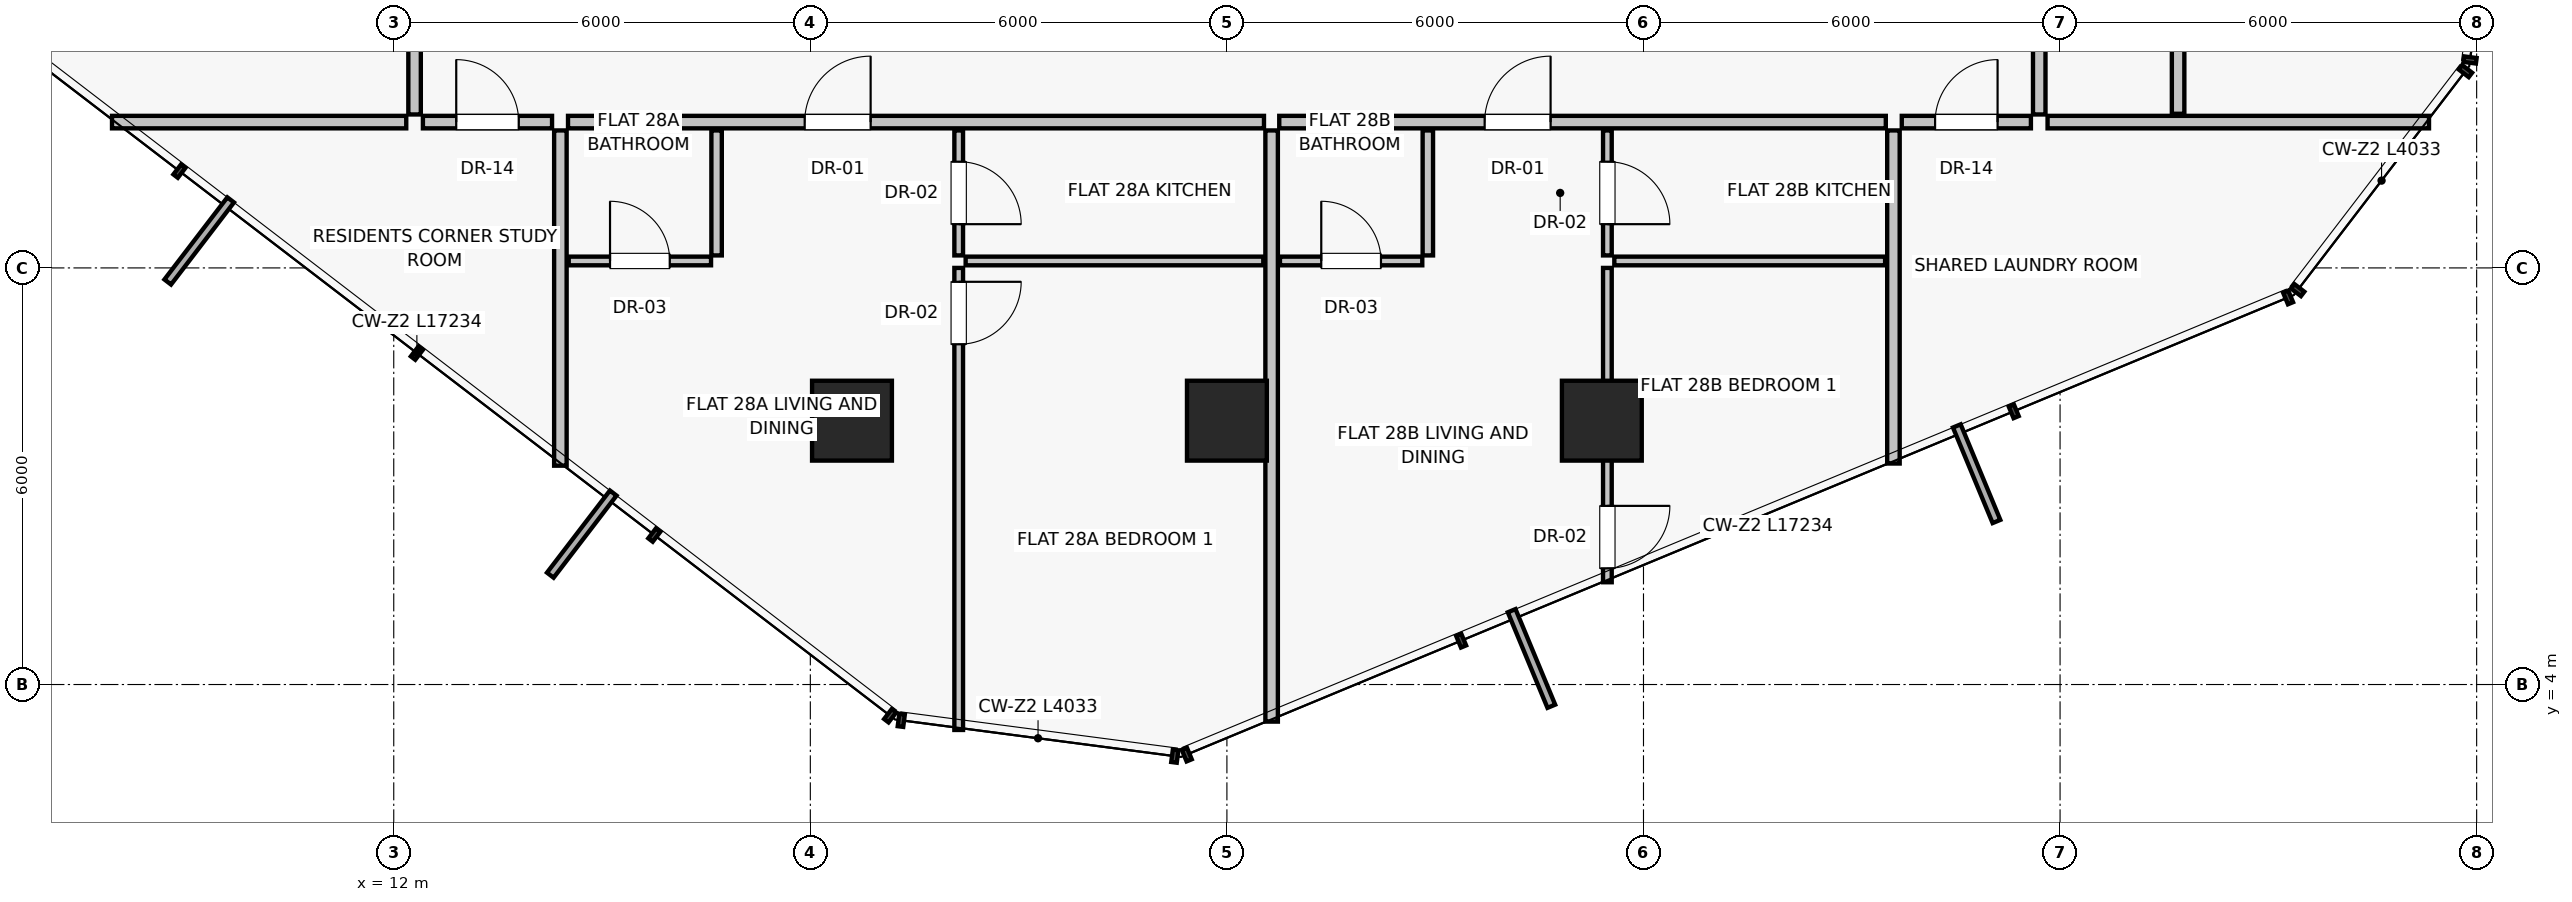
"""IFC4 building model, lengths in metres.
Left out: names, types, materials, properties, quantities, classifications, styles, units other than length and angle.
Written with IfcOpenShell. Run it as: python <this file> out.ifc"""

import sys

from ifc_helpers import new_model, si_unit, direction, frame, frame_2d, origin, origin_2d, place, context, subcontext, project, spatial, rectangle, extrude, source, transform, mapped, element, fill, save


model = new_model("IFC4")
c1 = context("Model", 3, precision=1e-05, world=origin(), true_north=direction((0.0, 1.0)))
c2 = subcontext(c1, "Body", "Model", "MODEL_VIEW")
j1 = project(units=[si_unit("LENGTHUNIT", "METRE"), si_unit("PLANEANGLEUNIT", "RADIAN")], contexts=[c1])
p1 = place(None, origin())
s1 = spatial("IfcSite", under=j1, at=p1, CompositionType="ELEMENT")
p2 = place(p1, origin())
s2 = spatial("IfcBuilding", under=s1, at=p2, CompositionType="ELEMENT")
p3 = place(p2, frame((0.0, 0.0, 102.45)))
s3 = spatial("IfcBuildingStorey", under=s2, at=p3, CompositionType="ELEMENT", Elevation=102.45)
for number, where, z_axis, x_axis in (
    (1, (18.6, 7.8, 0.0), (0.0, 0.0, 1.0), (1.0, 0.0, 0.0)),
    (2, (24.0, 7.8, 0.0), (0.0, 0.0, 1.0), (1.0, 0.0, 0.0)),
    (3, (29.4, 7.8, 0.0), (0.0, 0.0, 1.0), (1.0, 0.0, 0.0)),
):
    element("IfcColumn", number, at=place(p3, frame(where, z_axis=z_axis, x_axis=x_axis)), inside=s3, PredefinedType="COLUMN", context=c2, shape_type="SweptSolid", body=[
        extrude(rectangle(XDim=1.15, YDim=1.15, at=origin_2d()), origin(), (0.0, 0.0, 1.0), 3.25),
    ])
p4 = place(p3, frame((14.4, 11.98, 0.0), z_axis=(0.0, 0.0, 1.0), x_axis=(0.0, -1.0, 0.0)))
e4 = element("IfcWall", 4, at=p4, inside=s3, PredefinedType="PARTITIONING", context=c2, shape_type="SweptSolid", body=[
    extrude(rectangle(XDim=4.828, YDim=0.18, at=frame_2d((2.414, 0.0))), origin(), (0.0, 0.0, 1.0), 3.0),
])
p5 = place(p3, frame((33.6, 11.98, 0.0), z_axis=(0.0, 0.0, 1.0), x_axis=(0.0, -1.0, 0.0)))
e5 = element("IfcWall", 5, at=p5, inside=s3, PredefinedType="PARTITIONING", context=c2, shape_type="SweptSolid", body=[
    extrude(rectangle(XDim=4.797, YDim=0.18, at=frame_2d((2.398, 0.0))), origin(), (0.0, 0.0, 1.0), 3.0),
])
p6 = place(p3, frame((14.51, 12.1, 0.0), z_axis=(0.0, 0.0, 1.0), x_axis=(1.0, 0.0, 0.0)))
e6 = element("IfcWall", 6, at=p6, inside=s3, PredefinedType="PARTITIONING", context=c2, shape_type="SweptSolid", body=[
    extrude(rectangle(XDim=10.024, YDim=0.18, at=frame_2d((5.012, 0.0))), origin(), (0.0, 0.0, 1.0), 2.58),
])
p7 = place(p6, frame((3.408, 0.0, 0.0)))
e7 = element("IfcOpeningElement", 7, at=p7, cuts=e6, PredefinedType="OPENING", context=c2, shape_type="SweptSolid", body=[
    extrude(rectangle(XDim=0.95, YDim=2.02, at=frame_2d((0.475, 1.01))), frame((0.0, 0.1, 0.0), z_axis=(0.0, -1.0, 0.0), x_axis=(1.0, 0.0, 0.0)), (0.0, 0.0, 1.0), 0.2),
])
p8 = place(p3, frame((16.65, 11.98, 0.0), z_axis=(0.0, 0.0, 1.0), x_axis=(0.0, -1.0, 0.0)))
e8 = element("IfcWall", 8, at=p8, inside=s3, PredefinedType="PARTITIONING", context=c2, shape_type="SweptSolid", body=[
    extrude(rectangle(XDim=1.8, YDim=0.15, at=frame_2d((0.9, 0.0))), origin(), (0.0, 0.0, 1.0), 3.0),
])
p9 = place(p3, frame((14.52, 10.1, 0.0), z_axis=(0.0, 0.0, 1.0), x_axis=(1.0, 0.0, 0.0)))
e9 = element("IfcWall", 9, at=p9, inside=s3, PredefinedType="PARTITIONING", context=c2, shape_type="SweptSolid", body=[
    extrude(rectangle(XDim=2.05, YDim=0.125, at=frame_2d((1.025, 0.0))), origin(), (0.0, 0.0, 1.0), 3.0),
])
p10 = place(p9, frame((0.595, 0.0, 0.0)))
e10 = element("IfcOpeningElement", 10, at=p10, cuts=e9, PredefinedType="OPENING", context=c2, shape_type="SweptSolid", body=[
    extrude(rectangle(XDim=0.86, YDim=2.01, at=frame_2d((0.43, 1.005))), frame((0.0, 0.073, 0.0), z_axis=(0.0, -1.0, 0.0), x_axis=(1.0, 0.0, 0.0)), (0.0, 0.0, 1.0), 0.145),
])
p11 = place(p3, frame((20.137, 11.98, 0.0), z_axis=(0.0, 0.0, 1.0), x_axis=(0.0, -1.0, 0.0)))
e11 = element("IfcWall", 11, at=p11, inside=s3, PredefinedType="PARTITIONING", context=c2, shape_type="SweptSolid", body=[
    extrude(rectangle(XDim=1.8, YDim=0.125, at=frame_2d((0.9, 0.0))), origin(), (0.0, 0.0, 1.0), 3.0),
])
p12 = place(p11, frame((0.45, 0.0, 0.0)))
e12 = element("IfcOpeningElement", 12, at=p12, cuts=e11, PredefinedType="OPENING", context=c2, shape_type="SweptSolid", body=[
    extrude(rectangle(XDim=0.9, YDim=2.01, at=frame_2d((0.45, 1.005))), frame((0.0, 0.073, 0.0), z_axis=(0.0, -1.0, 0.0), x_axis=(1.0, 0.0, 0.0)), (0.0, 0.0, 1.0), 0.145),
])
p13 = place(p3, frame((20.237, 10.1, 0.0), z_axis=(0.0, 0.0, 1.0), x_axis=(1.0, 0.0, 0.0)))
e13 = element("IfcWall", 13, at=p13, inside=s3, PredefinedType="PARTITIONING", context=c2, shape_type="SweptSolid", body=[
    extrude(rectangle(XDim=4.287, YDim=0.125, at=frame_2d((2.144, 0.0))), origin(), (0.0, 0.0, 1.0), 3.0),
])
p14 = place(p3, frame((20.137, 10.0, 0.0), z_axis=(0.0, 0.0, 1.0), x_axis=(0.0, -1.0, 0.0)))
e14 = element("IfcWall", 14, at=p14, inside=s3, PredefinedType="PARTITIONING", context=c2, shape_type="SweptSolid", body=[
    extrude(rectangle(XDim=6.654, YDim=0.125, at=frame_2d((3.327, 0.0))), origin(), (0.0, 0.0, 1.0), 3.0),
])
p15 = place(p14, frame((0.2, 0.0, 0.0)))
e15 = element("IfcOpeningElement", 15, at=p15, cuts=e14, PredefinedType="OPENING", context=c2, shape_type="SweptSolid", body=[
    extrude(rectangle(XDim=0.9, YDim=2.01, at=frame_2d((0.45, 1.005))), frame((0.0, 0.073, 0.0), z_axis=(0.0, -1.0, 0.0), x_axis=(1.0, 0.0, 0.0)), (0.0, 0.0, 1.0), 0.145),
])
p16 = place(p3, frame((24.644, 11.98, 0.0), z_axis=(0.0, 0.0, 1.0), x_axis=(0.0, -1.0, 0.0)))
e16 = element("IfcWall", 16, at=p16, inside=s3, PredefinedType="PARTITIONING", context=c2, shape_type="SweptSolid", body=[
    extrude(rectangle(XDim=8.514, YDim=0.18, at=frame_2d((4.257, 0.0))), origin(), (0.0, 0.0, 1.0), 3.0),
])
p17 = place(p3, frame((24.754, 12.1, 0.0), z_axis=(0.0, 0.0, 1.0), x_axis=(1.0, 0.0, 0.0)))
e17 = element("IfcWall", 17, at=p17, inside=s3, PredefinedType="PARTITIONING", context=c2, shape_type="SweptSolid", body=[
    extrude(rectangle(XDim=8.736, YDim=0.18, at=frame_2d((4.368, 0.0))), origin(), (0.0, 0.0, 1.0), 2.58),
])
p18 = place(p17, frame((2.958, 0.0, 0.0)))
e18 = element("IfcOpeningElement", 18, at=p18, cuts=e17, PredefinedType="OPENING", context=c2, shape_type="SweptSolid", body=[
    extrude(rectangle(XDim=0.95, YDim=2.02, at=frame_2d((0.475, 1.01))), frame((0.0, 0.1, 0.0), z_axis=(0.0, -1.0, 0.0), x_axis=(1.0, 0.0, 0.0)), (0.0, 0.0, 1.0), 0.2),
])
p19 = place(p3, frame((26.894, 11.98, 0.0), z_axis=(0.0, 0.0, 1.0), x_axis=(0.0, -1.0, 0.0)))
e19 = element("IfcWall", 19, at=p19, inside=s3, PredefinedType="PARTITIONING", context=c2, shape_type="SweptSolid", body=[
    extrude(rectangle(XDim=1.8, YDim=0.15, at=frame_2d((0.9, 0.0))), origin(), (0.0, 0.0, 1.0), 3.0),
])
p20 = place(p3, frame((24.764, 10.1, 0.0), z_axis=(0.0, 0.0, 1.0), x_axis=(1.0, 0.0, 0.0)))
e20 = element("IfcWall", 20, at=p20, inside=s3, PredefinedType="PARTITIONING", context=c2, shape_type="SweptSolid", body=[
    extrude(rectangle(XDim=2.05, YDim=0.125, at=frame_2d((1.025, 0.0))), origin(), (0.0, 0.0, 1.0), 3.0),
])
p21 = place(p20, frame((0.595, 0.0, 0.0)))
e21 = element("IfcOpeningElement", 21, at=p21, cuts=e20, PredefinedType="OPENING", context=c2, shape_type="SweptSolid", body=[
    extrude(rectangle(XDim=0.86, YDim=2.01, at=frame_2d((0.43, 1.005))), frame((0.0, 0.073, 0.0), z_axis=(0.0, -1.0, 0.0), x_axis=(1.0, 0.0, 0.0)), (0.0, 0.0, 1.0), 0.145),
])
p22 = place(p3, frame((29.48, 11.98, 0.0), z_axis=(0.0, 0.0, 1.0), x_axis=(0.0, -1.0, 0.0)))
e22 = element("IfcWall", 22, at=p22, inside=s3, PredefinedType="PARTITIONING", context=c2, shape_type="SweptSolid", body=[
    extrude(rectangle(XDim=1.8, YDim=0.125, at=frame_2d((0.9, 0.0))), origin(), (0.0, 0.0, 1.0), 2.378),
])
p23 = place(p22, frame((0.45, 0.0, 0.0)))
e23 = element("IfcOpeningElement", 23, at=p23, cuts=e22, PredefinedType="OPENING", context=c2, shape_type="SweptSolid", body=[
    extrude(rectangle(XDim=0.9, YDim=2.01, at=frame_2d((0.45, 1.005))), frame((0.0, 0.073, 0.0), z_axis=(0.0, -1.0, 0.0), x_axis=(1.0, 0.0, 0.0)), (0.0, 0.0, 1.0), 0.145),
])
p24 = place(p3, frame((29.58, 10.1, 0.0), z_axis=(0.0, 0.0, 1.0), x_axis=(1.0, 0.0, 0.0)))
e24 = element("IfcWall", 24, at=p24, inside=s3, PredefinedType="PARTITIONING", context=c2, shape_type="SweptSolid", body=[
    extrude(rectangle(XDim=3.9, YDim=0.125, at=frame_2d((1.95, 0.0))), origin(), (0.0, 0.0, 1.0), 3.0),
])
p25 = place(p3, frame((29.48, 10.0, 0.0), z_axis=(0.0, 0.0, 1.0), x_axis=(0.0, -1.0, 0.0)))
e25 = element("IfcWall", 25, at=p25, inside=s3, PredefinedType="PARTITIONING", context=c2, shape_type="SweptSolid", body=[
    extrude(rectangle(XDim=4.527, YDim=0.125, at=frame_2d((2.264, 0.0))), origin(), (0.0, 0.0, 1.0), 2.378),
])
p26 = place(p25, frame((3.427, 0.0, 0.0)))
e26 = element("IfcOpeningElement", 26, at=p26, cuts=e25, PredefinedType="OPENING", context=c2, shape_type="SweptSolid", body=[
    extrude(rectangle(XDim=0.9, YDim=2.01, at=frame_2d((0.45, 1.005))), frame((0.0, 0.073, 0.0), z_axis=(0.0, -1.0, 0.0), x_axis=(1.0, 0.0, 0.0)), (0.0, 0.0, 1.0), 0.145),
])
p27 = place(p3, frame((12.18, 12.1, 0.0), z_axis=(0.0, 0.0, 1.0), x_axis=(-1.0, 0.0, 0.0)))
e27 = element("IfcWall", 27, at=p27, inside=s3, PredefinedType="PARTITIONING", context=c2, shape_type="SweptSolid", body=[
    extrude(rectangle(XDim=4.238, YDim=0.18, at=frame_2d((2.119, 0.0))), origin(), (0.0, 0.0, 1.0), 3.0),
])
p28 = place(p3, frame((12.3, 12.21, 0.0), z_axis=(0.0, 0.0, 1.0), x_axis=(0.0, 1.0, 0.0)))
e28 = element("IfcWall", 28, at=p28, inside=s3, PredefinedType="PARTITIONING", context=c2, shape_type="SweptSolid", body=[
    extrude(rectangle(XDim=4.626, YDim=0.18, at=frame_2d((2.313, 0.0))), origin(), (0.0, 0.0, 1.0), 3.0),
])
p29 = place(p28, frame((1.813, 0.0, 0.0)))
e29 = element("IfcOpeningElement", 29, at=p29, cuts=e28, PredefinedType="OPENING", context=c2, shape_type="SweptSolid", body=[
    extrude(rectangle(XDim=1.0, YDim=2.01, at=frame_2d((0.5, 1.005))), frame((0.0, 0.1, 0.0), z_axis=(0.0, -1.0, 0.0), x_axis=(1.0, 0.0, 0.0)), (0.0, 0.0, 1.0), 0.2),
])
p30 = place(p3, frame((35.82, 12.1, 0.0), z_axis=(0.0, 0.0, 1.0), x_axis=(1.0, 0.0, 0.0)))
e30 = element("IfcWall", 30, at=p30, inside=s3, PredefinedType="PARTITIONING", context=c2, shape_type="SweptSolid", body=[
    extrude(rectangle(XDim=5.494, YDim=0.18, at=frame_2d((2.747, 0.0))), origin(), (0.0, 0.0, 1.0), 3.0),
])
p31 = place(p3, frame((35.7, 12.21, 0.0), z_axis=(0.0, 0.0, 1.0), x_axis=(0.0, 1.0, 0.0)))
e31 = element("IfcWall", 31, at=p31, inside=s3, PredefinedType="PARTITIONING", context=c2, shape_type="SweptSolid", body=[
    extrude(rectangle(XDim=6.28, YDim=0.18, at=frame_2d((3.14, 0.0))), origin(), (0.0, 0.0, 1.0), 2.58),
])
p32 = place(p31, frame((2.64, 0.0, 0.0)))
e32 = element("IfcOpeningElement", 32, at=p32, cuts=e31, PredefinedType="OPENING", context=c2, shape_type="SweptSolid", body=[
    extrude(rectangle(XDim=1.0, YDim=2.01, at=frame_2d((0.5, 1.005))), frame((0.0, 0.1, 0.0), z_axis=(0.0, -1.0, 0.0), x_axis=(1.0, 0.0, 0.0)), (0.0, 0.0, 1.0), 0.2),
])
p33 = place(p3, frame((37.7, 12.22, 0.0), z_axis=(0.0, 0.0, 1.0), x_axis=(0.0, 1.0, 0.0)))
e33 = element("IfcWall", 33, at=p33, inside=s3, PredefinedType="PARTITIONING", context=c2, shape_type="SweptSolid", body=[
    extrude(rectangle(XDim=6.28, YDim=0.18, at=frame_2d((3.14, 0.0))), origin(), (0.0, 0.0, 1.0), 3.0),
])
p34 = place(p3, frame((12.42, 12.1, 0.0), z_axis=(0.0, 0.0, 1.0), x_axis=(1.0, 0.0, 0.0)))
e34 = element("IfcWall", 34, at=p34, inside=s3, PredefinedType="PARTITIONING", context=c2, shape_type="SweptSolid", body=[
    extrude(rectangle(XDim=1.86, YDim=0.18, at=frame_2d((0.93, 0.0))), origin(), (0.0, 0.0, 1.0), 3.0),
])
p35 = place(p34, frame((0.48, 0.0, 0.0)))
e35 = element("IfcOpeningElement", 35, at=p35, cuts=e34, PredefinedType="OPENING", context=c2, shape_type="SweptSolid", body=[
    extrude(rectangle(XDim=0.9, YDim=2.01, at=frame_2d((0.45, 1.005))), frame((0.0, 0.1, 0.0), z_axis=(0.0, -1.0, 0.0), x_axis=(1.0, 0.0, 0.0)), (0.0, 0.0, 1.0), 0.2),
])
p36 = place(p3, frame((33.72, 12.1, 0.0), z_axis=(0.0, 0.0, 1.0), x_axis=(1.0, 0.0, 0.0)))
e36 = element("IfcWall", 36, at=p36, inside=s3, PredefinedType="PARTITIONING", context=c2, shape_type="SweptSolid", body=[
    extrude(rectangle(XDim=1.86, YDim=0.18, at=frame_2d((0.93, 0.0))), origin(), (0.0, 0.0, 1.0), 3.0),
])
p37 = place(p36, frame((0.48, 0.0, 0.0)))
e37 = element("IfcOpeningElement", 37, at=p37, cuts=e36, PredefinedType="OPENING", context=c2, shape_type="SweptSolid", body=[
    extrude(rectangle(XDim=0.9, YDim=2.01, at=frame_2d((0.45, 1.005))), frame((0.0, 0.1, 0.0), z_axis=(0.0, -1.0, 0.0), x_axis=(1.0, 0.0, 0.0)), (0.0, 0.0, 1.0), 0.2),
])
m1 = source(origin(), c2, "Body", "SweptSolid", [
    extrude(rectangle(XDim=0.95, YDim=2.02, at=frame_2d((0.475, 1.01))), frame((0.0, 0.025, 0.0), z_axis=(0.0, -1.0, 0.0), x_axis=(1.0, 0.0, 0.0)), (0.0, 0.0, 1.0), 0.05),
])
p38 = place(p7, origin())
e38 = element("IfcDoor", 38, at=p38, inside=s3, OperationType="SINGLE_SWING_RIGHT", PredefinedType="DOOR", context=c2, shape_type="MappedRepresentation", body=[
    mapped(m1, transform((0.0, 0.0, 0.0), scale=1.0)),
])
fill(e7, e38)
m2 = source(origin(), c2, "Body", "SweptSolid", [
    extrude(rectangle(XDim=0.86, YDim=2.01, at=frame_2d((0.43, 1.005))), frame((0.0, 0.025, 0.0), z_axis=(0.0, -1.0, 0.0), x_axis=(1.0, 0.0, 0.0)), (0.0, 0.0, 1.0), 0.05),
])
p39 = place(p10, origin())
e39 = element("IfcDoor", 39, at=p39, inside=s3, OperationType="SINGLE_SWING_LEFT", PredefinedType="DOOR", context=c2, shape_type="MappedRepresentation", body=[
    mapped(m2, transform((0.0, 0.0, 0.0), scale=1.0)),
])
fill(e10, e39)
m3 = source(origin(), c2, "Body", "SweptSolid", [
    extrude(rectangle(XDim=0.9, YDim=2.01, at=frame_2d((0.45, 1.005))), frame((0.0, 0.025, 0.0), z_axis=(0.0, -1.0, 0.0), x_axis=(1.0, 0.0, 0.0)), (0.0, 0.0, 1.0), 0.05),
])
p40 = place(p12, origin())
e40 = element("IfcDoor", 40, at=p40, inside=s3, OperationType="SINGLE_SWING_RIGHT", PredefinedType="DOOR", context=c2, shape_type="MappedRepresentation", body=[
    mapped(m3, transform((0.0, 0.0, 0.0), scale=1.0)),
])
fill(e12, e40)
p41 = place(p15, origin())
e41 = element("IfcDoor", 41, at=p41, inside=s3, OperationType="SINGLE_SWING_LEFT", PredefinedType="DOOR", context=c2, shape_type="MappedRepresentation", body=[
    mapped(m3, transform((0.0, 0.0, 0.0), scale=1.0)),
])
fill(e15, e41)
p42 = place(p18, origin())
e42 = element("IfcDoor", 42, at=p42, inside=s3, OperationType="SINGLE_SWING_RIGHT", PredefinedType="DOOR", context=c2, shape_type="MappedRepresentation", body=[
    mapped(m1, transform((0.0, 0.0, 0.0), scale=1.0)),
])
fill(e18, e42)
p43 = place(p21, origin())
e43 = element("IfcDoor", 43, at=p43, inside=s3, OperationType="SINGLE_SWING_LEFT", PredefinedType="DOOR", context=c2, shape_type="MappedRepresentation", body=[
    mapped(m2, transform((0.0, 0.0, 0.0), scale=1.0)),
])
fill(e21, e43)
p44 = place(p23, origin())
e44 = element("IfcDoor", 44, at=p44, inside=s3, OperationType="SINGLE_SWING_RIGHT", PredefinedType="DOOR", context=c2, shape_type="MappedRepresentation", body=[
    mapped(m3, transform((0.0, 0.0, 0.0), scale=1.0)),
])
fill(e23, e44)
p45 = place(p26, origin())
e45 = element("IfcDoor", 45, at=p45, inside=s3, OperationType="SINGLE_SWING_LEFT", PredefinedType="DOOR", context=c2, shape_type="MappedRepresentation", body=[
    mapped(m3, transform((0.0, 0.0, 0.0), scale=1.0)),
])
fill(e26, e45)
p46 = place(p35, origin())
e46 = element("IfcDoor", 46, at=p46, inside=s3, OperationType="SINGLE_SWING_LEFT", PredefinedType="DOOR", context=c2, shape_type="MappedRepresentation", body=[
    mapped(m3, transform((0.0, 0.0, 0.0), scale=1.0)),
])
fill(e35, e46)
p47 = place(p37, origin())
e47 = element("IfcDoor", 47, at=p47, inside=s3, OperationType="SINGLE_SWING_RIGHT", PredefinedType="DOOR", context=c2, shape_type="MappedRepresentation", body=[
    mapped(m3, transform((0.0, 0.0, 0.0), scale=1.0)),
])
fill(e37, e47)
save(model, sys.argv[1])
